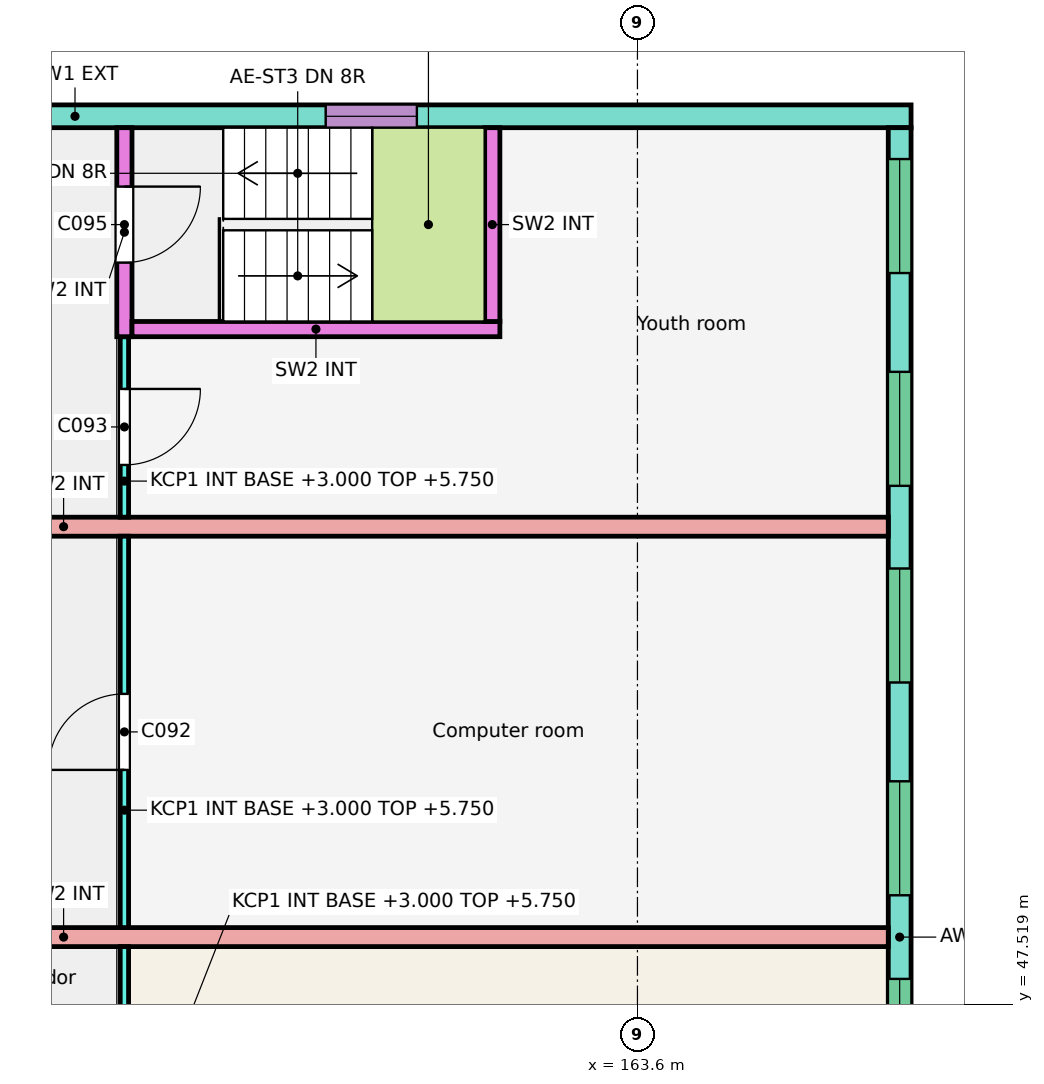
"""IFC4 building model, lengths in metres.
Left out: names, types, materials, properties, quantities, classifications, styles, units other than length and angle.
Written with IfcOpenShell. Run it as: python <this file> out.ifc"""

import sys

from ifc_helpers import new_model, si_unit, direction, frame, frame_2d, origin, place, context, subcontext, project, spatial, rectangle, extrude, element, fill, save


model = new_model("IFC4")
c1 = context("Model", 3, precision=1e-05, world=origin(), true_north=direction((0.0, 1.0)))
c2 = subcontext(c1, "Body", "Model", "MODEL_VIEW")
j1 = project(units=[si_unit("LENGTHUNIT", "METRE"), si_unit("PLANEANGLEUNIT", "RADIAN")], contexts=[c1])
p1 = place(None, origin())
s1 = spatial("IfcSite", under=j1, at=p1, CompositionType="ELEMENT")
p2 = place(p1, origin())
s2 = spatial("IfcBuilding", under=s1, at=p2, CompositionType="ELEMENT")
p3 = place(p2, frame((0.0, 0.0, 3.0)))
s3 = spatial("IfcBuildingStorey", under=s2, at=p3, CompositionType="ELEMENT", Elevation=3.0)
p4 = place(p3, frame((145.2, 59.2, 0.0), z_axis=(0.0, 0.0, 1.0), x_axis=(1.0, 0.0, 0.0)))
e1 = element("IfcWall", 1, at=p4, inside=s3, PredefinedType="SOLIDWALL", context=c2, shape_type="SweptSolid", body=[
    extrude(rectangle(XDim=22.0, YDim=0.3, at=frame_2d((11.0, 0.0))), origin(), (0.0, 0.0, 1.0), 3.0),
])
p5 = place(p4, frame((14.298, 0.0, 0.9)))
e2 = element("IfcOpeningElement", 2, at=p5, cuts=e1, PredefinedType="OPENING", context=c2, shape_type="SweptSolid", body=[
    extrude(rectangle(XDim=1.2, YDim=1.5, at=frame_2d((0.6, 0.75))), frame((0.0, 0.16, 0.0), z_axis=(0.0, -1.0, 0.0), x_axis=(1.0, 0.0, 0.0)), (0.0, 0.0, 1.0), 0.32),
])
p6 = place(p3, frame((167.05, 37.75, 0.0), z_axis=(0.0, 0.0, 1.0), x_axis=(0.0, 1.0, 0.0)))
e3 = element("IfcWall", 3, at=p6, inside=s3, PredefinedType="SOLIDWALL", context=c2, shape_type="SweptSolid", body=[
    extrude(rectangle(XDim=21.3, YDim=0.3, at=frame_2d((10.65, 0.0))), origin(), (0.0, 0.0, 1.0), 3.0),
])
p7 = place(p6, frame((0.413, 0.0, 0.9)))
e4 = element("IfcOpeningElement", 4, at=p7, cuts=e3, PredefinedType="OPENING", context=c2, shape_type="SweptSolid", body=[
    extrude(rectangle(XDim=1.5, YDim=1.4, at=frame_2d((0.75, 0.7))), frame((0.0, 0.16, 0.0), z_axis=(0.0, -1.0, 0.0), x_axis=(1.0, 0.0, 0.0)), (0.0, 0.0, 1.0), 0.32),
])
p8 = place(p6, frame((3.212, 0.0, 0.9)))
e5 = element("IfcOpeningElement", 5, at=p8, cuts=e3, PredefinedType="OPENING", context=c2, shape_type="SweptSolid", body=[
    extrude(rectangle(XDim=1.5, YDim=1.4, at=frame_2d((0.75, 0.7))), frame((0.0, 0.16, 0.0), z_axis=(0.0, -1.0, 0.0), x_axis=(1.0, 0.0, 0.0)), (0.0, 0.0, 1.0), 0.32),
])
p9 = place(p6, frame((5.8, 0.0, 0.9)))
e6 = element("IfcOpeningElement", 6, at=p9, cuts=e3, PredefinedType="OPENING", context=c2, shape_type="SweptSolid", body=[
    extrude(rectangle(XDim=1.5, YDim=1.4, at=frame_2d((0.75, 0.7))), frame((0.0, 0.16, 0.0), z_axis=(0.0, -1.0, 0.0), x_axis=(1.0, 0.0, 0.0)), (0.0, 0.0, 1.0), 0.32),
])
p10 = place(p6, frame((8.6, 0.0, 0.9)))
e7 = element("IfcOpeningElement", 7, at=p10, cuts=e3, PredefinedType="OPENING", context=c2, shape_type="SweptSolid", body=[
    extrude(rectangle(XDim=1.5, YDim=1.4, at=frame_2d((0.75, 0.7))), frame((0.0, 0.16, 0.0), z_axis=(0.0, -1.0, 0.0), x_axis=(1.0, 0.0, 0.0)), (0.0, 0.0, 1.0), 0.32),
])
p11 = place(p6, frame((11.2, 0.0, 0.9)))
e8 = element("IfcOpeningElement", 8, at=p11, cuts=e3, PredefinedType="OPENING", context=c2, shape_type="SweptSolid", body=[
    extrude(rectangle(XDim=1.5, YDim=1.4, at=frame_2d((0.75, 0.7))), frame((0.0, 0.16, 0.0), z_axis=(0.0, -1.0, 0.0), x_axis=(1.0, 0.0, 0.0)), (0.0, 0.0, 1.0), 0.32),
])
p12 = place(p6, frame((14.0, 0.0, 0.9)))
e9 = element("IfcOpeningElement", 9, at=p12, cuts=e3, PredefinedType="OPENING", context=c2, shape_type="SweptSolid", body=[
    extrude(rectangle(XDim=1.5, YDim=1.4, at=frame_2d((0.75, 0.7))), frame((0.0, 0.16, 0.0), z_axis=(0.0, -1.0, 0.0), x_axis=(1.0, 0.0, 0.0)), (0.0, 0.0, 1.0), 0.32),
])
p13 = place(p6, frame((16.587, 0.0, 0.9)))
e10 = element("IfcOpeningElement", 10, at=p13, cuts=e3, PredefinedType="OPENING", context=c2, shape_type="SweptSolid", body=[
    extrude(rectangle(XDim=1.5, YDim=1.4, at=frame_2d((0.75, 0.7))), frame((0.0, 0.16, 0.0), z_axis=(0.0, -1.0, 0.0), x_axis=(1.0, 0.0, 0.0)), (0.0, 0.0, 1.0), 0.32),
])
p14 = place(p6, frame((19.387, 0.0, 0.9)))
e11 = element("IfcOpeningElement", 11, at=p14, cuts=e3, PredefinedType="OPENING", context=c2, shape_type="SweptSolid", body=[
    extrude(rectangle(XDim=1.5, YDim=1.4, at=frame_2d((0.75, 0.7))), frame((0.0, 0.16, 0.0), z_axis=(0.0, -1.0, 0.0), x_axis=(1.0, 0.0, 0.0)), (0.0, 0.0, 1.0), 0.32),
])
for number, where, z_axis, x_axis in (
    (12, (145.2, 48.4, 0.0), (0.0, 0.0, 1.0), (1.0, 0.0, 0.0)),
    (13, (145.2, 53.8, 0.0), (0.0, 0.0, 1.0), (1.0, 0.0, 0.0)),
):
    element("IfcWall", number, at=place(p3, frame(where, z_axis=z_axis, x_axis=x_axis)), inside=s3, PredefinedType="SOLIDWALL", context=c2, shape_type="SweptSolid", body=[
        extrude(rectangle(XDim=21.7, YDim=0.25, at=frame_2d((10.85, 0.0))), origin(), (0.0, 0.0, 1.0), 3.0),
    ])
p15 = place(p3, frame((156.85, 43.125, 0.0), z_axis=(0.0, 0.0, 1.0), x_axis=(0.0, 1.0, 0.0)))
e14 = element("IfcWall", 14, at=p15, inside=s3, PredefinedType="PARTITIONING", context=c2, shape_type="SweptSolid", body=[
    extrude(rectangle(XDim=5.15, YDim=0.11, at=frame_2d((2.575, 0.0))), origin(), (0.0, 0.0, 1.0), 2.75),
])
p16 = place(p15, frame((0.698, 0.0, 0.0)))
e15 = element("IfcOpeningElement", 15, at=p16, cuts=e14, PredefinedType="OPENING", context=c2, shape_type="SweptSolid", body=[
    extrude(rectangle(XDim=1.0, YDim=2.1, at=frame_2d((0.5, 1.05))), frame((0.0, 0.065, 0.0), z_axis=(0.0, -1.0, 0.0), x_axis=(1.0, 0.0, 0.0)), (0.0, 0.0, 1.0), 0.13),
])
p17 = place(p15, frame((3.327, 0.0, 0.0)))
e16 = element("IfcOpeningElement", 16, at=p17, cuts=e14, PredefinedType="OPENING", context=c2, shape_type="SweptSolid", body=[
    extrude(rectangle(XDim=1.0, YDim=2.1, at=frame_2d((0.5, 1.05))), frame((0.0, 0.065, 0.0), z_axis=(0.0, -1.0, 0.0), x_axis=(1.0, 0.0, 0.0)), (0.0, 0.0, 1.0), 0.13),
])
p18 = place(p3, frame((156.85, 48.525, 0.0), z_axis=(0.0, 0.0, 1.0), x_axis=(0.0, 1.0, 0.0)))
e17 = element("IfcWall", 17, at=p18, inside=s3, PredefinedType="PARTITIONING", context=c2, shape_type="SweptSolid", body=[
    extrude(rectangle(XDim=5.15, YDim=0.11, at=frame_2d((2.575, 0.0))), origin(), (0.0, 0.0, 1.0), 2.75),
])
p19 = place(p18, frame((2.075, 0.0, 0.0)))
e18 = element("IfcOpeningElement", 18, at=p19, cuts=e17, PredefinedType="OPENING", context=c2, shape_type="SweptSolid", body=[
    extrude(rectangle(XDim=1.0, YDim=2.1, at=frame_2d((0.5, 1.05))), frame((0.0, 0.065, 0.0), z_axis=(0.0, -1.0, 0.0), x_axis=(1.0, 0.0, 0.0)), (0.0, 0.0, 1.0), 0.13),
])
p20 = place(p3, frame((156.85, 53.925, 0.0), z_axis=(0.0, 0.0, 1.0), x_axis=(0.0, 1.0, 0.0)))
e19 = element("IfcWall", 19, at=p20, inside=s3, PredefinedType="PARTITIONING", context=c2, shape_type="SweptSolid", body=[
    extrude(rectangle(XDim=2.375, YDim=0.11, at=frame_2d((1.188, 0.0))), origin(), (0.0, 0.0, 1.0), 2.75),
])
p21 = place(p20, frame((0.688, 0.0, 0.0)))
e20 = element("IfcOpeningElement", 20, at=p21, cuts=e19, PredefinedType="OPENING", context=c2, shape_type="SweptSolid", body=[
    extrude(rectangle(XDim=1.0, YDim=2.1, at=frame_2d((0.5, 1.05))), frame((0.0, 0.065, 0.0), z_axis=(0.0, -1.0, 0.0), x_axis=(1.0, 0.0, 0.0)), (0.0, 0.0, 1.0), 0.13),
])
p22 = place(p3, frame((156.85, 56.3, 0.0), z_axis=(0.0, 0.0, 1.0), x_axis=(0.0, 1.0, 0.0)))
e21 = element("IfcWall", 21, at=p22, inside=s3, PredefinedType="SOLIDWALL", context=c2, shape_type="SweptSolid", body=[
    extrude(rectangle(XDim=2.75, YDim=0.2, at=frame_2d((1.375, 0.0))), origin(), (0.0, 0.0, 1.0), 2.75),
])
p23 = place(p22, frame((0.975, 0.0, 0.0)))
e22 = element("IfcOpeningElement", 22, at=p23, cuts=e21, PredefinedType="OPENING", context=c2, shape_type="SweptSolid", body=[
    extrude(rectangle(XDim=1.0, YDim=2.1, at=frame_2d((0.5, 1.05))), frame((0.0, 0.11, 0.0), z_axis=(0.0, -1.0, 0.0), x_axis=(1.0, 0.0, 0.0)), (0.0, 0.0, 1.0), 0.22),
])
p24 = place(p3, frame((156.95, 56.4, 0.0), z_axis=(0.0, 0.0, 1.0), x_axis=(1.0, 0.0, 0.0)))
e23 = element("IfcWall", 23, at=p24, inside=s3, PredefinedType="SOLIDWALL", context=c2, shape_type="SweptSolid", body=[
    extrude(rectangle(XDim=4.84, YDim=0.2, at=frame_2d((2.42, 0.0))), origin(), (0.0, 0.0, 1.0), 2.75),
])
p25 = place(p3, frame((161.69, 59.05, 0.0), z_axis=(0.0, 0.0, 1.0), x_axis=(0.0, -1.0, 0.0)))
e24 = element("IfcWall", 24, at=p25, inside=s3, PredefinedType="SOLIDWALL", context=c2, shape_type="SweptSolid", body=[
    extrude(rectangle(XDim=2.55, YDim=0.2, at=frame_2d((1.275, 0.0))), origin(), (0.0, 0.0, 1.0), 2.75),
])
p26 = place(p10, origin())
e25 = element("IfcWindow", 25, at=p26, inside=s3, PartitioningType="SINGLE_PANEL", PredefinedType="WINDOW", context=c2, shape_type="SweptSolid", body=[
    extrude(rectangle(XDim=1.5, YDim=1.4, at=frame_2d((0.75, 0.7))), frame((0.0, 0.03, 0.0), z_axis=(0.0, -1.0, 0.0), x_axis=(1.0, 0.0, 0.0)), (0.0, 0.0, 1.0), 0.06),
])
fill(e7, e25)
p27 = place(p11, origin())
e26 = element("IfcWindow", 26, at=p27, inside=s3, PartitioningType="SINGLE_PANEL", PredefinedType="WINDOW", context=c2, shape_type="SweptSolid", body=[
    extrude(rectangle(XDim=1.5, YDim=1.4, at=frame_2d((0.75, 0.7))), frame((0.0, 0.03, 0.0), z_axis=(0.0, -1.0, 0.0), x_axis=(1.0, 0.0, 0.0)), (0.0, 0.0, 1.0), 0.06),
])
fill(e8, e26)
p28 = place(p12, origin())
e27 = element("IfcWindow", 27, at=p28, inside=s3, PartitioningType="SINGLE_PANEL", PredefinedType="WINDOW", context=c2, shape_type="SweptSolid", body=[
    extrude(rectangle(XDim=1.5, YDim=1.4, at=frame_2d((0.75, 0.7))), frame((0.0, 0.03, 0.0), z_axis=(0.0, -1.0, 0.0), x_axis=(1.0, 0.0, 0.0)), (0.0, 0.0, 1.0), 0.06),
])
fill(e9, e27)
p29 = place(p13, origin())
e28 = element("IfcWindow", 28, at=p29, inside=s3, PartitioningType="SINGLE_PANEL", PredefinedType="WINDOW", context=c2, shape_type="SweptSolid", body=[
    extrude(rectangle(XDim=1.5, YDim=1.4, at=frame_2d((0.75, 0.7))), frame((0.0, 0.03, 0.0), z_axis=(0.0, -1.0, 0.0), x_axis=(1.0, 0.0, 0.0)), (0.0, 0.0, 1.0), 0.06),
])
fill(e10, e28)
p30 = place(p14, origin())
e29 = element("IfcWindow", 29, at=p30, inside=s3, PartitioningType="SINGLE_PANEL", PredefinedType="WINDOW", context=c2, shape_type="SweptSolid", body=[
    extrude(rectangle(XDim=1.5, YDim=1.4, at=frame_2d((0.75, 0.7))), frame((0.0, 0.03, 0.0), z_axis=(0.0, -1.0, 0.0), x_axis=(1.0, 0.0, 0.0)), (0.0, 0.0, 1.0), 0.06),
])
fill(e11, e29)
p31 = place(p5, origin())
e30 = element("IfcWindow", 30, at=p31, inside=s3, PartitioningType="SINGLE_PANEL", PredefinedType="WINDOW", context=c2, shape_type="SweptSolid", body=[
    extrude(rectangle(XDim=1.2, YDim=1.5, at=frame_2d((0.6, 0.75))), frame((0.0, 0.03, 0.0), z_axis=(0.0, -1.0, 0.0), x_axis=(1.0, 0.0, 0.0)), (0.0, 0.0, 1.0), 0.06),
])
fill(e2, e30)
p32 = place(p19, origin())
e31 = element("IfcDoor", 31, at=p32, inside=s3, OperationType="SINGLE_SWING_LEFT", PredefinedType="DOOR", context=c2, shape_type="SweptSolid", body=[
    extrude(rectangle(XDim=1.0, YDim=2.1, at=frame_2d((0.5, 1.05))), frame((0.0, 0.025, 0.0), z_axis=(0.0, -1.0, 0.0), x_axis=(1.0, 0.0, 0.0)), (0.0, 0.0, 1.0), 0.05),
])
fill(e18, e31)
p33 = place(p21, origin())
e32 = element("IfcDoor", 32, at=p33, inside=s3, OperationType="SINGLE_SWING_RIGHT", PredefinedType="DOOR", context=c2, shape_type="SweptSolid", body=[
    extrude(rectangle(XDim=1.0, YDim=2.1, at=frame_2d((0.5, 1.05))), frame((0.0, 0.025, 0.0), z_axis=(0.0, -1.0, 0.0), x_axis=(1.0, 0.0, 0.0)), (0.0, 0.0, 1.0), 0.05),
])
fill(e20, e32)
p34 = place(p23, origin())
e33 = element("IfcDoor", 33, at=p34, inside=s3, OperationType="SINGLE_SWING_RIGHT", PredefinedType="DOOR", context=c2, shape_type="SweptSolid", body=[
    extrude(rectangle(XDim=1.0, YDim=2.1, at=frame_2d((0.5, 1.05))), frame((0.0, 0.025, 0.0), z_axis=(0.0, -1.0, 0.0), x_axis=(1.0, 0.0, 0.0)), (0.0, 0.0, 1.0), 0.05),
])
fill(e22, e33)
save(model, sys.argv[1])
